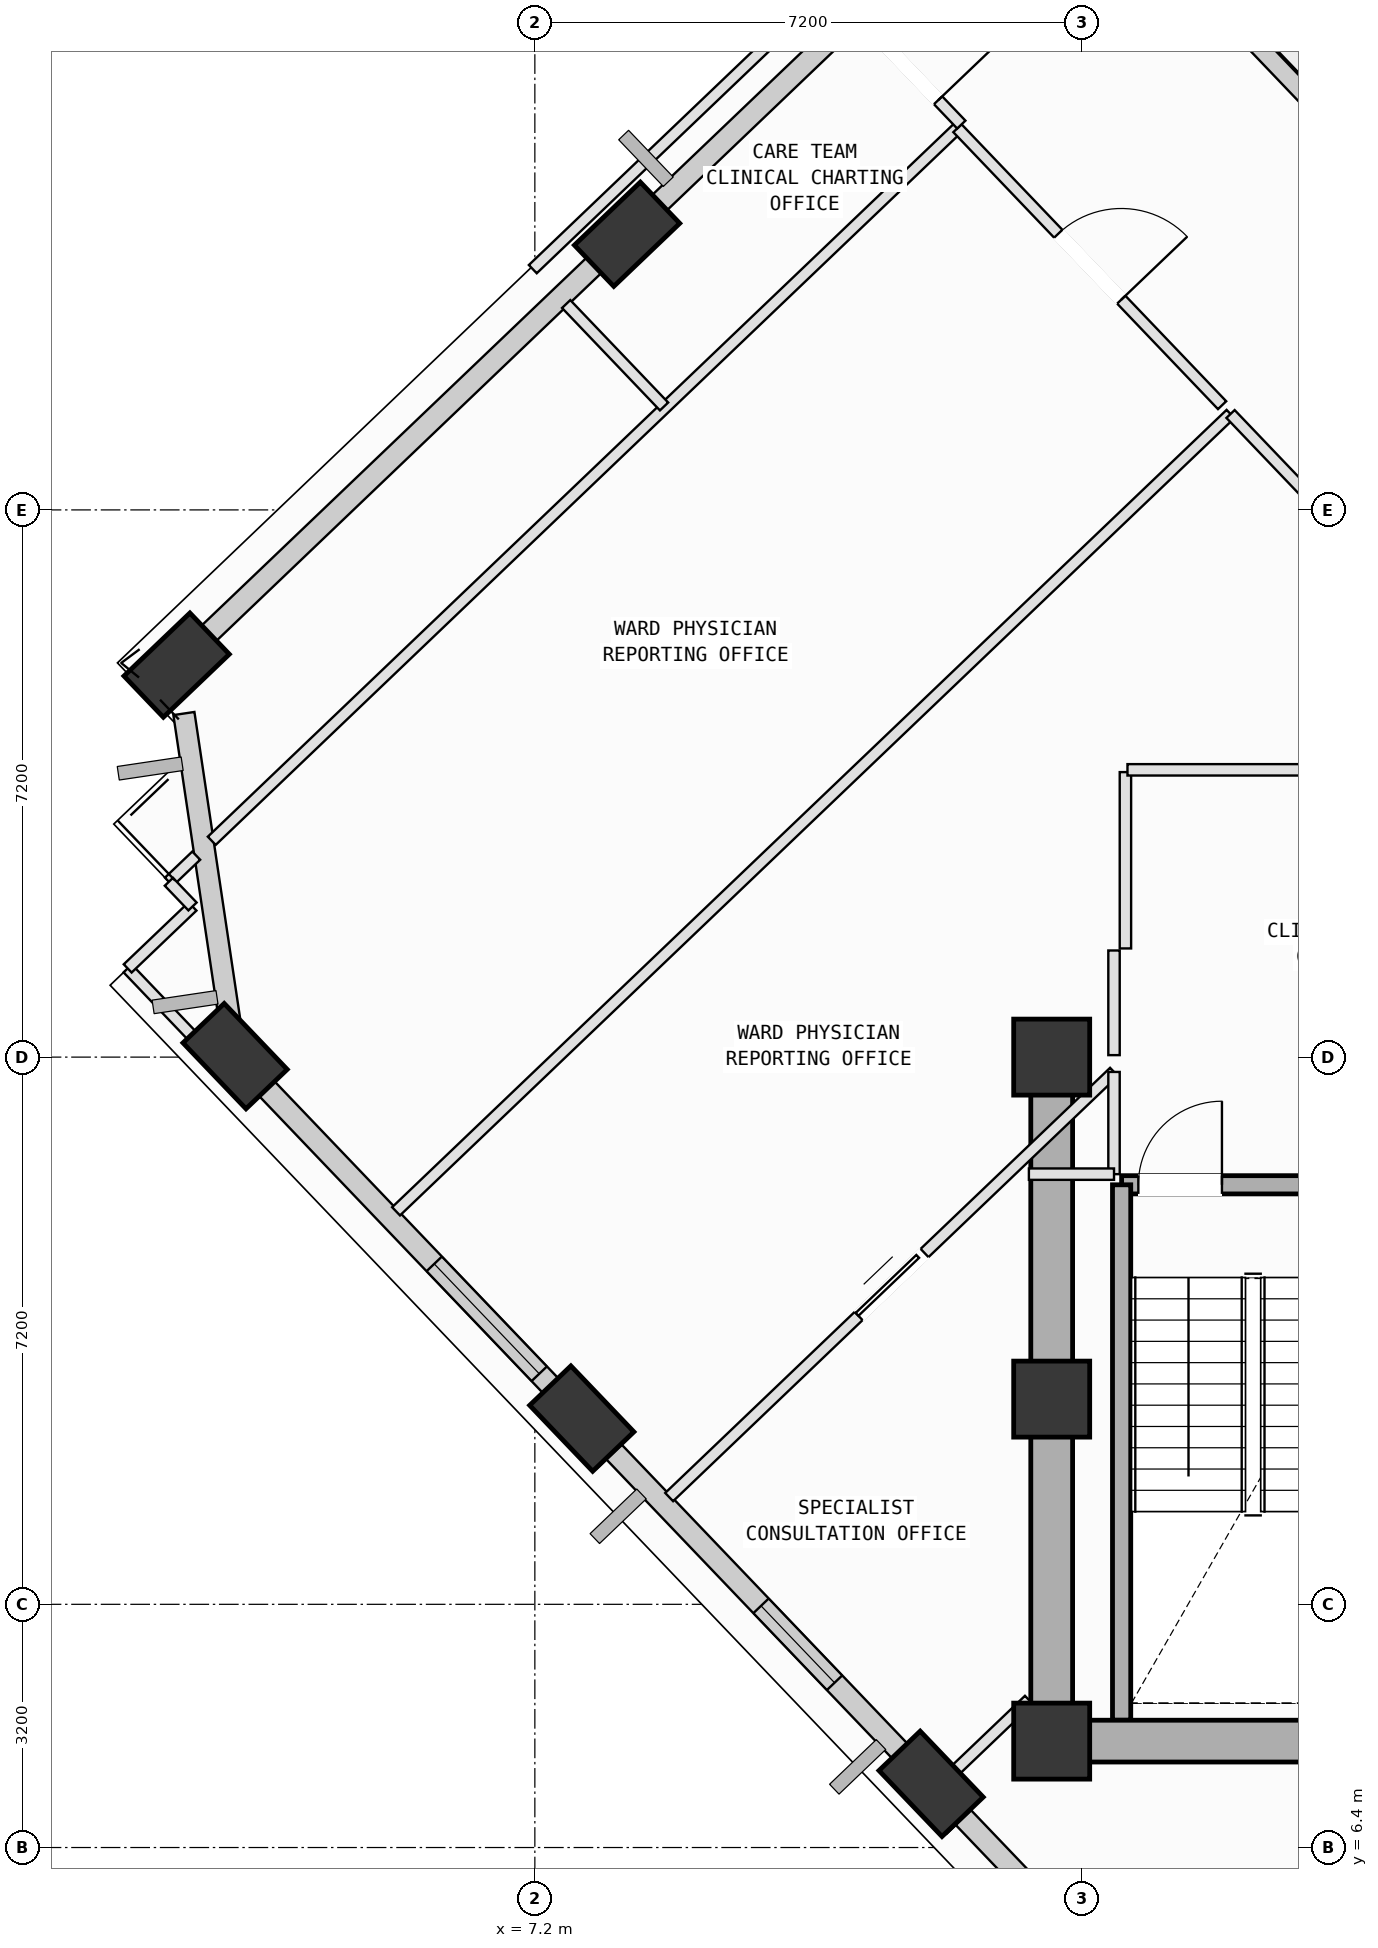
"""IFC4 building model, lengths in metres.
Left out: names, types, materials, properties, quantities, classifications, styles, units other than length and angle.
Written with IfcOpenShell. Run it as: python <this file> out.ifc"""

import sys

from ifc_helpers import new_model, si_unit, direction, frame, frame_2d, origin, origin_2d, place, context, subcontext, project, spatial, rectangle, extrude, element, fill, save


model = new_model("IFC4")
c1 = context("Model", 3, precision=1e-05, world=origin(), true_north=direction((0.0, 1.0)))
c2 = subcontext(c1, "Body", "Model", "MODEL_VIEW")
j1 = project(units=[si_unit("LENGTHUNIT", "METRE"), si_unit("PLANEANGLEUNIT", "RADIAN")], contexts=[c1])
p1 = place(None, origin())
s1 = spatial("IfcSite", under=j1, at=p1, CompositionType="ELEMENT")
p2 = place(p1, origin())
s2 = spatial("IfcBuilding", under=s1, at=p2, CompositionType="ELEMENT")
p3 = place(p2, frame((0.0, 0.0, 211.2)))
s3 = spatial("IfcBuildingStorey", under=s2, at=p3, CompositionType="ELEMENT", Elevation=211.2)
for number, where, z_axis, x_axis in (
    (1, (14.0, 7.8, 0.0), (0.0, 0.0, 1.0), (1.0, 0.0, 0.0)),
    (2, (14.0, 12.3, 0.0), (0.0, 0.0, 1.0), (1.0, 0.0, 0.0)),
    (3, (14.0, 16.8, 0.0), (0.0, 0.0, 1.0), (1.0, 0.0, 0.0)),
):
    element("IfcColumn", number, at=place(p3, frame(where, z_axis=z_axis, x_axis=x_axis)), inside=s3, PredefinedType="COLUMN", context=c2, shape_type="SweptSolid", body=[
        extrude(rectangle(XDim=1.0, YDim=1.0, at=origin_2d()), origin(), (0.0, 0.0, 1.0), 4.0),
    ])
p4 = place(p3, frame((8.413, 27.627, 0.074), z_axis=(-0.010828197195, -0.10395069307, 0.994523505783), x_axis=(0.790264048258, 0.608497317732, 0.072206290191)))
e4 = element("IfcColumn", 4, at=p4, inside=s3, PredefinedType="COLUMN", context=c2, shape_type="SweptSolid", body=[
    extrude(rectangle(XDim=1.2, YDim=0.75, at=origin_2d()), origin(), (0.0, 0.0, 1.0), 3.946),
])
p5 = place(p3, frame((2.487, 21.958, 0.091), z_axis=(0.012639647301, -0.127821531287, 0.991716640707), x_axis=(0.652034928504, 0.752977822647, 0.088740355036)))
e5 = element("IfcColumn", 5, at=p5, inside=s3, PredefinedType="COLUMN", context=c2, shape_type="SweptSolid", body=[
    extrude(rectangle(XDim=1.2, YDim=0.75, at=origin_2d()), origin(), (0.0, 0.0, 1.0), 3.94),
])
p6 = place(p3, frame((3.256, 16.813, 0.092), z_axis=(0.033776019116, -0.124444488778, 0.991651526367), x_axis=(-0.854551559252, 0.510931381474, 0.093224224348)))
e6 = element("IfcColumn", 6, at=p6, inside=s3, PredefinedType="COLUMN", context=c2, shape_type="SweptSolid", body=[
    extrude(rectangle(XDim=1.2, YDim=0.75, at=origin_2d()), origin(), (0.0, 0.0, 1.0), 3.939),
])
p7 = place(p3, frame((7.817, 12.044, 0.084), z_axis=(0.05339263645, -0.105670345457, 0.992966769063), x_axis=(-0.940385366867, 0.329163998052, 0.085594533524)))
e7 = element("IfcColumn", 7, at=p7, inside=s3, PredefinedType="COLUMN", context=c2, shape_type="SweptSolid", body=[
    extrude(rectangle(XDim=1.2, YDim=0.75, at=origin_2d()), origin(), (0.0, 0.0, 1.0), 3.942),
])
p8 = place(p3, frame((12.413, 7.238, 0.081), z_axis=(0.073007355521, -0.086692364486, 0.993556420129), x_axis=(-0.991154266902, 0.104398471659, 0.08194008981)))
e8 = element("IfcColumn", 8, at=p8, inside=s3, PredefinedType="COLUMN", context=c2, shape_type="SweptSolid", body=[
    extrude(rectangle(XDim=1.2, YDim=0.75, at=origin_2d()), origin(), (0.0, 0.0, 1.0), 3.943),
])
p9 = place(p3, frame((15.902, 30.959, 0.0), z_axis=(0.0, 0.0, 1.0), x_axis=(0.690876921508, -0.722972391816, 0.0)))
e9 = element("IfcWall", 9, at=p9, inside=s3, PredefinedType="SOLIDWALL", context=c2, shape_type="SweptSolid", body=[
    extrude(rectangle(XDim=6.96, YDim=0.24, at=frame_2d((3.48, 0.0))), origin(), (0.0, 0.0, 1.0), 3.265),
])
p10 = place(p9, frame((3.597, 0.0, 0.0)))
e10 = element("IfcOpeningElement", 10, at=p10, cuts=e9, PredefinedType="OPENING", context=c2, shape_type="SweptSolid", body=[
    extrude(rectangle(XDim=1.1, YDim=2.15, at=frame_2d((0.55, 1.075))), frame((0.0, 0.13, 0.0), z_axis=(0.0, -1.0, 0.0), x_axis=(1.0, 0.0, 0.0)), (0.0, 0.0, 1.0), 0.26),
])
p11 = place(p3, frame((8.568, 27.782, 0.0), z_axis=(0.0, 0.0, 1.0), x_axis=(0.722966997623, 0.69088256625, 0.0)))
e11 = element("IfcWall", 11, at=p11, inside=s3, PredefinedType="SOLIDWALL", context=c2, shape_type="SweptSolid", body=[
    extrude(rectangle(XDim=7.434, YDim=0.28, at=frame_2d((3.717, 0.0))), origin(), (0.0, 0.0, 1.0), 3.265),
])
p12 = place(p3, frame((2.617, 22.095, 0.0), z_axis=(0.0, 0.0, 1.0), x_axis=(0.722973311948, 0.690875958629, 0.0)))
e12 = element("IfcWall", 12, at=p12, inside=s3, PredefinedType="SOLIDWALL", context=c2, shape_type="SweptSolid", body=[
    extrude(rectangle(XDim=7.485, YDim=0.28, at=frame_2d((3.742, 0.0))), origin(), (0.0, 0.0, 1.0), 3.265),
])
p13 = place(p3, frame((3.233, 16.961, 0.0), z_axis=(0.0, 0.0, 1.0), x_axis=(-0.147544168779, 0.989055467736, 0.0)))
e13 = element("IfcWall", 13, at=p13, inside=s3, PredefinedType="SOLIDWALL", context=c2, shape_type="SweptSolid", body=[
    extrude(rectangle(XDim=4.408, YDim=0.28, at=frame_2d((2.204, 0.0))), origin(), (0.0, 0.0, 1.0), 3.265),
])
p14 = place(p3, frame((7.7, 12.171, 0.0), z_axis=(0.0, 0.0, 1.0), x_axis=(-0.690886955568, 0.722962803072, 0.0)))
e14 = element("IfcWall", 14, at=p14, inside=s3, PredefinedType="SOLIDWALL", context=c2, shape_type="SweptSolid", body=[
    extrude(rectangle(XDim=5.83, YDim=0.28, at=frame_2d((2.915, 0.0))), origin(), (0.0, 0.0, 1.0), 3.265),
])
p15 = place(p14, frame((0.64, 0.0, 0.75)))
e15 = element("IfcOpeningElement", 15, at=p15, cuts=e14, PredefinedType="OPENING", context=c2, shape_type="SweptSolid", body=[
    extrude(rectangle(XDim=2.0, YDim=1.95, at=frame_2d((1.0, 0.975))), frame((0.0, 0.15, 0.0), z_axis=(0.0, -1.0, 0.0), x_axis=(1.0, 0.0, 0.0)), (0.0, 0.0, 1.0), 0.3),
])
p16 = place(p3, frame((12.29, 7.368, 0.0), z_axis=(0.0, 0.0, 1.0), x_axis=(-0.690908576556, 0.722942140729, 0.0)))
e16 = element("IfcWall", 16, at=p16, inside=s3, PredefinedType="SOLIDWALL", context=c2, shape_type="SweptSolid", body=[
    extrude(rectangle(XDim=5.861, YDim=0.28, at=frame_2d((2.93, 0.0))), origin(), (0.0, 0.0, 1.0), 3.265),
])
p17 = place(p16, frame((1.66, 0.0, 0.75)))
e17 = element("IfcOpeningElement", 17, at=p17, cuts=e16, PredefinedType="OPENING", context=c2, shape_type="SweptSolid", body=[
    extrude(rectangle(XDim=1.4, YDim=1.85, at=frame_2d((0.7, 0.925))), frame((0.0, 0.15, 0.0), z_axis=(0.0, -1.0, 0.0), x_axis=(1.0, 0.0, 0.0)), (0.0, 0.0, 1.0), 0.3),
])
p18 = place(p3, frame((18.061, 1.329, 0.0), z_axis=(0.0, 0.0, 1.0), x_axis=(-0.690871278524, 0.722977784244, 0.0)))
e18 = element("IfcWall", 18, at=p18, inside=s3, PredefinedType="SOLIDWALL", context=c2, shape_type="SweptSolid", body=[
    extrude(rectangle(XDim=7.558, YDim=0.28, at=frame_2d((3.779, 0.0))), origin(), (0.0, 0.0, 1.0), 3.265),
])
p19 = place(p18, frame((4.506, 0.0, 0.75)))
e19 = element("IfcOpeningElement", 19, at=p19, cuts=e18, PredefinedType="OPENING", context=c2, shape_type="SweptSolid", body=[
    extrude(rectangle(XDim=1.8, YDim=2.05, at=frame_2d((0.9, 1.025))), frame((0.0, 0.15, 0.0), z_axis=(0.0, -1.0, 0.0), x_axis=(1.0, 0.0, 0.0)), (0.0, 0.0, 1.0), 0.3),
])
p20 = place(p3, frame((14.92, 15.12, 0.0), z_axis=(0.0, 0.0, 1.0), x_axis=(1.0, 0.0, 0.0)))
e20 = element("IfcWall", 20, at=p20, inside=s3, PredefinedType="SOLIDWALL", context=c2, shape_type="SweptSolid", body=[
    extrude(rectangle(XDim=3.46, YDim=0.24, at=frame_2d((1.73, 0.0))), origin(), (0.0, 0.0, 1.0), 3.78),
])
p21 = place(p20, frame((0.22, 0.0, 0.0)))
e21 = element("IfcOpeningElement", 21, at=p21, cuts=e20, PredefinedType="OPENING", context=c2, shape_type="SweptSolid", body=[
    extrude(rectangle(XDim=1.1, YDim=2.15, at=frame_2d((0.55, 1.075))), frame((0.0, 0.13, 0.0), z_axis=(0.0, -1.0, 0.0), x_axis=(1.0, 0.0, 0.0)), (0.0, 0.0, 1.0), 0.26),
])
p22 = place(p3, frame((14.92, 8.075, 0.0), z_axis=(0.0, 0.0, 1.0), x_axis=(0.0, 1.0, 0.0)))
e22 = element("IfcWall", 22, at=p22, inside=s3, PredefinedType="SOLIDWALL", context=c2, shape_type="SweptSolid", body=[
    extrude(rectangle(XDim=7.045, YDim=0.24, at=frame_2d((3.522, 0.0))), origin(), (0.0, 0.0, 1.0), 3.78),
])
p23 = place(p3, frame((14.0, 7.8, 0.0), z_axis=(0.0, 0.0, 1.0), x_axis=(1.0, 0.0, 0.0)))
e23 = element("IfcWall", 23, at=p23, inside=s3, PredefinedType="SHEAR", context=c2, shape_type="SweptSolid", body=[
    extrude(rectangle(XDim=10.8, YDim=0.55, at=frame_2d((5.4, 0.0))), origin(), (0.0, 0.0, 1.0), 3.78),
])
p24 = place(p3, frame((14.0, 16.8, 0.0), z_axis=(0.0, 0.0, 1.0), x_axis=(0.0, -1.0, 0.0)))
e24 = element("IfcWall", 24, at=p24, inside=s3, PredefinedType="SHEAR", context=c2, shape_type="SweptSolid", body=[
    extrude(rectangle(XDim=9.0, YDim=0.55, at=frame_2d((4.5, 0.0))), origin(), (0.0, 0.0, 1.0), 3.78),
])
p25 = place(p3, frame((12.673, 6.634, 0.0), z_axis=(0.0, 0.0, 1.0), x_axis=(-0.690895549769, 0.722954590074, 0.0)))
e25 = element("IfcWall", 25, at=p25, inside=s3, PredefinedType="PARTITIONING", context=c2, shape_type="SweptSolid", body=[
    extrude(rectangle(XDim=0.525, YDim=0.15, at=frame_2d((0.263, 0.0))), origin(), (0.0, 0.0, 1.0), 3.265),
])
p26 = place(p3, frame((12.31, 7.014, 0.0), z_axis=(0.0, 0.0, 1.0), x_axis=(0.72298928154, 0.69085924672, 0.0)))
e26 = element("IfcWall", 26, at=p26, inside=s3, PredefinedType="PARTITIONING", context=c2, shape_type="SweptSolid", body=[
    extrude(rectangle(XDim=1.922, YDim=0.15, at=frame_2d((0.961, 0.0))), origin(), (0.0, 0.0, 1.0), 2.765),
])
p27 = place(p3, frame((8.967, 11.011, 0.0), z_axis=(0.0, 0.0, 1.0), x_axis=(0.72292274285, 0.690928873235, 0.0)))
e27 = element("IfcWall", 27, at=p27, inside=s3, PredefinedType="PARTITIONING", context=c2, shape_type="SweptSolid", body=[
    extrude(rectangle(XDim=8.096, YDim=0.15, at=frame_2d((4.048, 0.0))), origin(), (0.0, 0.0, 1.0), 3.78),
])
p28 = place(p27, frame((3.448, 0.0, 0.0)))
e28 = element("IfcOpeningElement", 28, at=p28, cuts=e27, PredefinedType="OPENING", context=c2, shape_type="SweptSolid", body=[
    extrude(rectangle(XDim=1.2, YDim=2.15, at=frame_2d((0.6, 1.075))), frame((0.0, 0.085, 0.0), z_axis=(0.0, -1.0, 0.0), x_axis=(1.0, 0.0, 0.0)), (0.0, 0.0, 1.0), 0.17),
])
p29 = place(p3, frame((14.82, 16.605, 0.0), z_axis=(0.0, 0.0, 1.0), x_axis=(0.0, -1.0, 0.0)))
e29 = element("IfcWall", 29, at=p29, inside=s3, PredefinedType="PARTITIONING", context=c2, shape_type="SweptSolid", body=[
    extrude(rectangle(XDim=1.345, YDim=0.15, at=frame_2d((0.672, 0.0))), origin(), (0.0, 0.0, 1.0), 3.78),
])
p30 = place(p3, frame((14.82, 15.26, 0.0), z_axis=(0.0, 0.0, 1.0), x_axis=(-1.0, 0.0, 0.0)))
e30 = element("IfcWall", 30, at=p30, inside=s3, PredefinedType="PARTITIONING", context=c2, shape_type="SweptSolid", body=[
    extrude(rectangle(XDim=1.12, YDim=0.15, at=frame_2d((0.56, 0.0))), origin(), (0.0, 0.0, 1.0), 3.78),
])
p31 = place(p3, frame((14.97, 20.55, 0.0), z_axis=(0.0, 0.0, 1.0), x_axis=(0.0, -1.0, 0.0)))
e31 = element("IfcWall", 31, at=p31, inside=s3, PredefinedType="PARTITIONING", context=c2, shape_type="SweptSolid", body=[
    extrude(rectangle(XDim=2.32, YDim=0.15, at=frame_2d((1.16, 0.0))), origin(), (0.0, 0.0, 1.0), 3.78),
])
p32 = place(p3, frame((14.82, 18.203, 0.0), z_axis=(0.0, 0.0, 1.0), x_axis=(0.0, -1.0, 0.0)))
e32 = element("IfcWall", 32, at=p32, inside=s3, PredefinedType="PARTITIONING", context=c2, shape_type="SweptSolid", body=[
    extrude(rectangle(XDim=1.377, YDim=0.15, at=frame_2d((0.688, 0.0))), origin(), (0.0, 0.0, 1.0), 3.78),
])
p33 = place(p3, frame((8.075, 11.446, 0.0), z_axis=(0.0, 0.0, 1.0), x_axis=(-0.691024375966, 0.722831454643, 0.0)))
e33 = element("IfcWall", 33, at=p33, inside=s3, PredefinedType="PARTITIONING", context=c2, shape_type="SweptSolid", body=[
    extrude(rectangle(XDim=0.783, YDim=0.15, at=frame_2d((0.392, 0.0))), origin(), (0.0, 0.0, 1.0), 3.265),
])
p34 = place(p3, frame((5.374, 14.771, 0.0), z_axis=(0.0, 0.0, 1.0), x_axis=(0.722993367921, 0.690854970267, 0.0)))
e34 = element("IfcWall", 34, at=p34, inside=s3, PredefinedType="PARTITIONING", context=c2, shape_type="SweptSolid", body=[
    extrude(rectangle(XDim=15.186, YDim=0.15, at=frame_2d((7.593, 0.0))), origin(), (0.0, 0.0, 1.0), 3.78),
])
p35 = place(p3, frame((16.353, 25.262, 0.0), z_axis=(0.0, 0.0, 1.0), x_axis=(0.690842016715, -0.723005745441, 0.0)))
e35 = element("IfcWall", 35, at=p35, inside=s3, PredefinedType="PARTITIONING", context=c2, shape_type="SweptSolid", body=[
    extrude(rectangle(XDim=5.04, YDim=0.15, at=frame_2d((2.52, 0.0))), origin(), (0.0, 0.0, 1.0), 3.78),
])
p36 = place(p35, frame((1.92, 0.0, 0.0)))
e36 = element("IfcOpeningElement", 36, at=p36, cuts=e35, PredefinedType="OPENING", context=c2, shape_type="SweptSolid", body=[
    extrude(rectangle(XDim=1.2, YDim=2.15, at=frame_2d((0.6, 1.075))), frame((0.0, 0.085, 0.0), z_axis=(0.0, -1.0, 0.0), x_axis=(1.0, 0.0, 0.0)), (0.0, 0.0, 1.0), 0.17),
])
p37 = place(p3, frame((18.748, 20.58, 0.0), z_axis=(0.0, 0.0, 1.0), x_axis=(-1.0, 0.0, 0.0)))
e37 = element("IfcWall", 37, at=p37, inside=s3, PredefinedType="PARTITIONING", context=c2, shape_type="SweptSolid", body=[
    extrude(rectangle(XDim=3.751, YDim=0.15, at=frame_2d((1.875, 0.0))), origin(), (0.0, 0.0, 1.0), 3.78),
])
p38 = place(p3, frame((2.385, 19.107, 0.0), z_axis=(0.0, 0.0, 1.0), x_axis=(0.723099511244, 0.690743872097, 0.0)))
e38 = element("IfcWall", 38, at=p38, inside=s3, PredefinedType="PARTITIONING", context=c2, shape_type="SweptSolid", body=[
    extrude(rectangle(XDim=0.498, YDim=0.15, at=frame_2d((0.249, 0.0))), origin(), (0.0, 0.0, 1.0), 3.78),
])
p39 = place(p3, frame((2.949, 19.646, 0.0), z_axis=(0.0, 0.0, 1.0), x_axis=(0.722954347525, 0.690895803573, 0.0)))
e39 = element("IfcWall", 39, at=p39, inside=s3, PredefinedType="PARTITIONING", context=c2, shape_type="SweptSolid", body=[
    extrude(rectangle(XDim=13.571, YDim=0.15, at=frame_2d((6.785, 0.0))), origin(), (0.0, 0.0, 1.0), 3.78),
])
p40 = place(p3, frame((12.76, 29.022, 0.0), z_axis=(0.0, 0.0, 1.0), x_axis=(0.690842016715, -0.723005745441, 0.0)))
e40 = element("IfcWall", 40, at=p40, inside=s3, PredefinedType="PARTITIONING", context=c2, shape_type="SweptSolid", body=[
    extrude(rectangle(XDim=5.04, YDim=0.15, at=frame_2d((2.52, 0.0))), origin(), (0.0, 0.0, 1.0), 3.78),
])
p41 = place(p40, frame((1.92, 0.0, 0.0)))
e41 = element("IfcOpeningElement", 41, at=p41, cuts=e40, PredefinedType="OPENING", context=c2, shape_type="SweptSolid", body=[
    extrude(rectangle(XDim=1.2, YDim=2.15, at=frame_2d((0.6, 1.075))), frame((0.0, 0.085, 0.0), z_axis=(0.0, -1.0, 0.0), x_axis=(1.0, 0.0, 0.0)), (0.0, 0.0, 1.0), 0.17),
])
p42 = place(p3, frame((3.505, 16.227, 0.0), z_axis=(0.0, 0.0, 1.0), x_axis=(-0.690685671957, 0.723155102694, 0.0)))
e42 = element("IfcWall", 42, at=p42, inside=s3, PredefinedType="PARTITIONING", context=c2, shape_type="SweptSolid", body=[
    extrude(rectangle(XDim=2.406, YDim=0.15, at=frame_2d((1.203, 0.0))), origin(), (0.0, 0.0, 1.0), 3.265),
])
p43 = place(p3, frame((1.843, 17.967, 0.0), z_axis=(0.0, 0.0, 1.0), x_axis=(0.723064191365, 0.690780844527, 0.0)))
e43 = element("IfcWall", 43, at=p43, inside=s3, PredefinedType="PARTITIONING", context=c2, shape_type="SweptSolid", body=[
    extrude(rectangle(XDim=1.18, YDim=0.15, at=frame_2d((0.59, 0.0))), origin(), (0.0, 0.0, 1.0), 3.78),
])
p44 = place(p3, frame((2.696, 18.782, 0.0), z_axis=(0.0, 0.0, 1.0), x_axis=(-0.691469068757, 0.722406067909, 0.0)))
e44 = element("IfcWall", 44, at=p44, inside=s3, PredefinedType="PARTITIONING", context=c2, shape_type="SweptSolid", body=[
    extrude(rectangle(XDim=0.45, YDim=0.15, at=frame_2d((0.225, 0.0))), origin(), (0.0, 0.0, 1.0), 3.78),
])
p45 = place(p3, frame((8.9, 25.361, 0.0), z_axis=(0.0, 0.0, 1.0), x_axis=(-0.69081517616, 0.723031391011, 0.0)))
e45 = element("IfcWall", 45, at=p45, inside=s3, PredefinedType="PARTITIONING", context=c2, shape_type="SweptSolid", body=[
    extrude(rectangle(XDim=1.864, YDim=0.15, at=frame_2d((0.932, 0.0))), origin(), (0.0, 0.0, 1.0), 2.765),
])
p46 = place(p3, frame((7.173, 27.168, 0.0), z_axis=(0.0, 0.0, 1.0), x_axis=(0.722958515641, 0.690891442024, 0.0)))
e46 = element("IfcWall", 46, at=p46, inside=s3, PredefinedType="PARTITIONING", context=c2, shape_type="SweptSolid", body=[
    extrude(rectangle(XDim=5.39, YDim=0.15, at=frame_2d((2.695, 0.0))), origin(), (0.0, 0.0, 1.0), 3.78),
])
p47 = place(p3, frame((11.509, 30.433, 0.0), z_axis=(0.0, 0.0, 1.0), x_axis=(0.690731383484, -0.723111440838, 0.0)))
e47 = element("IfcWall", 47, at=p47, inside=s3, PredefinedType="PARTITIONING", context=c2, shape_type="SweptSolid", body=[
    extrude(rectangle(XDim=1.885, YDim=0.15, at=frame_2d((0.942, 0.0))), origin(), (0.0, 0.0, 1.0), 3.78),
])
p48 = place(p47, frame((0.442, 0.0, 0.0)))
e48 = element("IfcOpeningElement", 48, at=p48, cuts=e47, PredefinedType="OPENING", context=c2, shape_type="SweptSolid", body=[
    extrude(rectangle(XDim=1.0, YDim=2.12, at=frame_2d((0.5, 1.06))), frame((0.0, 0.085, 0.0), z_axis=(0.0, -1.0, 0.0), x_axis=(1.0, 0.0, 0.0)), (0.0, 0.0, 1.0), 0.17),
])
p49 = place(p15, origin())
e49 = element("IfcWindow", 49, at=p49, inside=s3, PartitioningType="SINGLE_PANEL", PredefinedType="WINDOW", context=c2, shape_type="SweptSolid", body=[
    extrude(rectangle(XDim=2.0, YDim=1.95, at=frame_2d((1.0, 0.975))), frame((0.0, 0.03, 0.0), z_axis=(0.0, -1.0, 0.0), x_axis=(1.0, 0.0, 0.0)), (0.0, 0.0, 1.0), 0.06),
])
fill(e15, e49)
p50 = place(p17, origin())
e50 = element("IfcWindow", 50, at=p50, inside=s3, PartitioningType="SINGLE_PANEL", PredefinedType="WINDOW", context=c2, shape_type="SweptSolid", body=[
    extrude(rectangle(XDim=1.4, YDim=1.85, at=frame_2d((0.7, 0.925))), frame((0.0, 0.03, 0.0), z_axis=(0.0, -1.0, 0.0), x_axis=(1.0, 0.0, 0.0)), (0.0, 0.0, 1.0), 0.06),
])
fill(e17, e50)
p51 = place(p21, origin())
e51 = element("IfcDoor", 51, at=p51, inside=s3, OperationType="SINGLE_SWING_RIGHT", PredefinedType="DOOR", context=c2, shape_type="SweptSolid", body=[
    extrude(rectangle(XDim=1.1, YDim=2.15, at=frame_2d((0.55, 1.075))), frame((0.0, 0.025, 0.0), z_axis=(0.0, -1.0, 0.0), x_axis=(1.0, 0.0, 0.0)), (0.0, 0.0, 1.0), 0.05),
])
fill(e21, e51)
p52 = place(p41, origin())
e52 = element("IfcDoor", 52, at=p52, inside=s3, OperationType="SINGLE_SWING_RIGHT", PredefinedType="DOOR", context=c2, shape_type="SweptSolid", body=[
    extrude(rectangle(XDim=1.2, YDim=2.15, at=frame_2d((0.6, 1.075))), frame((0.0, 0.025, 0.0), z_axis=(0.0, -1.0, 0.0), x_axis=(1.0, 0.0, 0.0)), (0.0, 0.0, 1.0), 0.05),
])
fill(e41, e52)
p53 = place(p48, origin())
e53 = element("IfcDoor", 53, at=p53, inside=s3, OperationType="SINGLE_SWING_RIGHT", PredefinedType="DOOR", context=c2, shape_type="SweptSolid", body=[
    extrude(rectangle(XDim=1.0, YDim=2.12, at=frame_2d((0.5, 1.06))), frame((0.0, 0.025, 0.0), z_axis=(0.0, -1.0, 0.0), x_axis=(1.0, 0.0, 0.0)), (0.0, 0.0, 1.0), 0.05),
])
fill(e48, e53)
p54 = place(p28, origin())
e54 = element("IfcDoor", 54, at=p54, inside=s3, OperationType="SLIDING_TO_LEFT", PredefinedType="DOOR", context=c2, shape_type="SweptSolid", body=[
    extrude(rectangle(XDim=1.2, YDim=2.15, at=frame_2d((0.6, 1.075))), frame((0.0, 0.025, 0.0), z_axis=(0.0, -1.0, 0.0), x_axis=(1.0, 0.0, 0.0)), (0.0, 0.0, 1.0), 0.05),
])
fill(e28, e54)
save(model, sys.argv[1])
